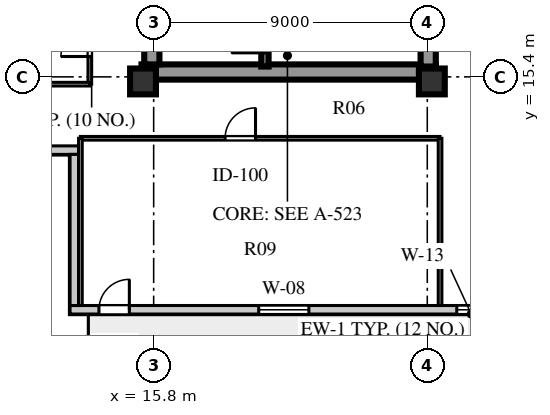
"""IFC4 building model, lengths in metres.
Left out: names, types, materials, properties, quantities, classifications, styles, units other than length and angle.
Written with IfcOpenShell. Run it as: python <this file> out.ifc"""

import sys

from ifc_helpers import new_model, si_unit, direction, frame, frame_2d, origin, origin_2d, place, context, subcontext, project, spatial, rectangle, extrude, element, fill, save


model = new_model("IFC4")
c1 = context("Model", 3, precision=1e-05, world=origin(), true_north=direction((0.0, 1.0)))
c2 = subcontext(c1, "Body", "Model", "MODEL_VIEW")
j1 = project(units=[si_unit("LENGTHUNIT", "METRE"), si_unit("PLANEANGLEUNIT", "RADIAN")], contexts=[c1])
p1 = place(None, origin())
s1 = spatial("IfcSite", under=j1, at=p1, CompositionType="ELEMENT")
p2 = place(p1, origin())
s2 = spatial("IfcBuilding", under=s1, at=p2, CompositionType="ELEMENT")
p3 = place(p2, frame((0.0, 0.0, 173.3)))
s3 = spatial("IfcBuildingStorey", under=s2, at=p3, CompositionType="ELEMENT", Elevation=173.3)
p4 = place(p3, frame((15.4, 15.56, 0.0), z_axis=(0.0, 0.0, 1.0), x_axis=(1.0, 0.0, 0.0)))
e1 = element("IfcWall", 1, at=p4, inside=s3, PredefinedType="SHEAR", context=c2, shape_type="SweptSolid", body=[
    extrude(rectangle(XDim=9.68, YDim=0.5, at=frame_2d((4.84, 0.0))), origin(), (0.0, 0.0, 1.0), 3.6),
])
p5 = place(p3, frame((15.74, 15.81, 0.0), z_axis=(0.0, 0.0, 1.0), x_axis=(0.0, 1.0, 0.0)))
e2 = element("IfcWall", 2, at=p5, inside=s3, PredefinedType="SHEAR", context=c2, shape_type="SweptSolid", body=[
    extrude(rectangle(XDim=25.63, YDim=0.5, at=frame_2d((12.815, 0.0))), origin(), (0.0, 0.0, 1.0), 3.6),
])
p6 = place(p3, frame((24.83, 15.74, 0.0), z_axis=(0.0, 0.0, 1.0), x_axis=(0.0, 1.0, 0.0)))
e3 = element("IfcWall", 3, at=p6, inside=s3, PredefinedType="SHEAR", context=c2, shape_type="SweptSolid", body=[
    extrude(rectangle(XDim=25.76, YDim=0.5, at=frame_2d((12.88, 0.0))), origin(), (0.0, 0.0, 1.0), 3.6),
])
p7 = place(p6, frame((1.61, 0.0, 0.0)))
e4 = element("IfcOpeningElement", 4, at=p7, cuts=e3, PredefinedType="OPENING", context=c2, shape_type="SweptSolid", body=[
    extrude(rectangle(XDim=1.2, YDim=2.1, at=frame_2d((0.6, 1.05))), frame((0.0, 0.26, 0.0), z_axis=(0.0, -1.0, 0.0), x_axis=(1.0, 0.0, 0.0)), (0.0, 0.0, 1.0), 0.52),
])
p8 = place(p6, frame((6.78, 0.0, 0.0)))
e5 = element("IfcOpeningElement", 5, at=p8, cuts=e3, PredefinedType="OPENING", context=c2, shape_type="SweptSolid", body=[
    extrude(rectangle(XDim=0.85, YDim=2.06, at=frame_2d((0.425, 1.03))), frame((0.0, 0.26, 0.0), z_axis=(0.0, -1.0, 0.0), x_axis=(1.0, 0.0, 0.0)), (0.0, 0.0, 1.0), 0.52),
])
p9 = place(p6, frame((12.11, 0.0, 0.0)))
e6 = element("IfcOpeningElement", 6, at=p9, cuts=e3, PredefinedType="OPENING", context=c2, shape_type="SweptSolid", body=[
    extrude(rectangle(XDim=1.5, YDim=2.12, at=frame_2d((0.75, 1.06))), frame((0.0, 0.26, 0.0), z_axis=(0.0, -1.0, 0.0), x_axis=(1.0, 0.0, 0.0)), (0.0, 0.0, 1.0), 0.52),
])
p10 = place(p6, frame((20.11, 0.0, 0.0)))
e7 = element("IfcOpeningElement", 7, at=p10, cuts=e3, PredefinedType="OPENING", context=c2, shape_type="SweptSolid", body=[
    extrude(rectangle(XDim=1.2, YDim=2.12, at=frame_2d((0.6, 1.06))), frame((0.0, 0.26, 0.0), z_axis=(0.0, -1.0, 0.0), x_axis=(1.0, 0.0, 0.0)), (0.0, 0.0, 1.0), 0.52),
])
p11 = place(p6, frame((24.01, 0.0, 0.0)))
e8 = element("IfcOpeningElement", 8, at=p11, cuts=e3, PredefinedType="OPENING", context=c2, shape_type="SweptSolid", body=[
    extrude(rectangle(XDim=0.95, YDim=2.1, at=frame_2d((0.475, 1.05))), frame((0.0, 0.26, 0.0), z_axis=(0.0, -1.0, 0.0), x_axis=(1.0, 0.0, 0.0)), (0.0, 0.0, 1.0), 0.52),
])
for number, where, z_axis, x_axis in (
    (9, (15.45, 15.25, 0.0), (0.0, 0.0, 1.0), (1.0, 0.0, 0.0)),
    (10, (24.95, 15.25, 0.0), (0.0, 0.0, 1.0), (1.0, 0.0, 0.0)),
):
    element("IfcColumn", number, at=place(p3, frame(where, z_axis=z_axis, x_axis=x_axis)), inside=s3, PredefinedType="COLUMN", context=c2, shape_type="SweptSolid", body=[
        extrude(rectangle(XDim=0.85, YDim=0.85, at=origin_2d()), origin(), (0.0, 0.0, 1.0), 3.6),
    ])
p12 = place(p3, frame((13.05, 7.74, 0.0), z_axis=(0.0, 0.0, 1.0), x_axis=(1.0, 0.0, 0.0)))
e11 = element("IfcWall", 11, at=p12, inside=s3, PredefinedType="STANDARD", context=c2, shape_type="SweptSolid", body=[
    extrude(rectangle(XDim=32.5, YDim=0.28, at=frame_2d((16.25, 0.0))), origin(), (0.0, 0.0, 1.0), 3.6),
])
p13 = place(p12, frame((0.95, 0.0, 0.0)))
e12 = element("IfcOpeningElement", 12, at=p13, cuts=e11, PredefinedType="OPENING", context=c2, shape_type="SweptSolid", body=[
    extrude(rectangle(XDim=1.0, YDim=2.05, at=frame_2d((0.5, 1.025))), frame((0.0, 0.15, 0.0), z_axis=(0.0, -1.0, 0.0), x_axis=(1.0, 0.0, 0.0)), (0.0, 0.0, 1.0), 0.3),
])
p14 = place(p12, frame((6.205, 0.0, 0.8)))
e13 = element("IfcOpeningElement", 13, at=p14, cuts=e11, PredefinedType="OPENING", context=c2, shape_type="SweptSolid", body=[
    extrude(rectangle(XDim=1.65, YDim=1.95, at=frame_2d((0.825, 0.975))), frame((0.0, 0.15, 0.0), z_axis=(0.0, -1.0, 0.0), x_axis=(1.0, 0.0, 0.0)), (0.0, 0.0, 1.0), 0.3),
])
p15 = place(p12, frame((12.72, 0.0, 0.8)))
e14 = element("IfcOpeningElement", 14, at=p15, cuts=e11, PredefinedType="OPENING", context=c2, shape_type="SweptSolid", body=[
    extrude(rectangle(XDim=0.95, YDim=1.65, at=frame_2d((0.475, 0.825))), frame((0.0, 0.15, 0.0), z_axis=(0.0, -1.0, 0.0), x_axis=(1.0, 0.0, 0.0)), (0.0, 0.0, 1.0), 0.3),
])
p16 = place(p12, frame((14.685, 0.0, 0.8)))
e15 = element("IfcOpeningElement", 15, at=p16, cuts=e11, PredefinedType="OPENING", context=c2, shape_type="SweptSolid", body=[
    extrude(rectangle(XDim=1.2, YDim=1.75, at=frame_2d((0.6, 0.875))), frame((0.0, 0.15, 0.0), z_axis=(0.0, -1.0, 0.0), x_axis=(1.0, 0.0, 0.0)), (0.0, 0.0, 1.0), 0.3),
])
p17 = place(p12, frame((17.085, 0.0, 0.8)))
e16 = element("IfcOpeningElement", 16, at=p17, cuts=e11, PredefinedType="OPENING", context=c2, shape_type="SweptSolid", body=[
    extrude(rectangle(XDim=1.8, YDim=2.0, at=frame_2d((0.9, 1.0))), frame((0.0, 0.15, 0.0), z_axis=(0.0, -1.0, 0.0), x_axis=(1.0, 0.0, 0.0)), (0.0, 0.0, 1.0), 0.3),
])
p18 = place(p12, frame((20.085, 0.0, 0.8)))
e17 = element("IfcOpeningElement", 17, at=p18, cuts=e11, PredefinedType="OPENING", context=c2, shape_type="SweptSolid", body=[
    extrude(rectangle(XDim=1.2, YDim=1.75, at=frame_2d((0.6, 0.875))), frame((0.0, 0.15, 0.0), z_axis=(0.0, -1.0, 0.0), x_axis=(1.0, 0.0, 0.0)), (0.0, 0.0, 1.0), 0.3),
])
p19 = place(p12, frame((23.055, 0.0, 0.8)))
e18 = element("IfcOpeningElement", 18, at=p19, cuts=e11, PredefinedType="OPENING", context=c2, shape_type="SweptSolid", body=[
    extrude(rectangle(XDim=1.2, YDim=1.75, at=frame_2d((0.6, 0.875))), frame((0.0, 0.15, 0.0), z_axis=(0.0, -1.0, 0.0), x_axis=(1.0, 0.0, 0.0)), (0.0, 0.0, 1.0), 0.3),
])
p20 = place(p12, frame((26.065, 0.0, 0.8)))
e19 = element("IfcOpeningElement", 19, at=p20, cuts=e11, PredefinedType="OPENING", context=c2, shape_type="SweptSolid", body=[
    extrude(rectangle(XDim=1.2, YDim=1.75, at=frame_2d((0.6, 0.875))), frame((0.0, 0.15, 0.0), z_axis=(0.0, -1.0, 0.0), x_axis=(1.0, 0.0, 0.0)), (0.0, 0.0, 1.0), 0.3),
])
p21 = place(p12, frame((29.03, 0.0, 0.8)))
e20 = element("IfcOpeningElement", 20, at=p21, cuts=e11, PredefinedType="OPENING", context=c2, shape_type="SweptSolid", body=[
    extrude(rectangle(XDim=2.1, YDim=1.95, at=frame_2d((1.05, 0.975))), frame((0.0, 0.15, 0.0), z_axis=(0.0, -1.0, 0.0), x_axis=(1.0, 0.0, 0.0)), (0.0, 0.0, 1.0), 0.3),
])
p22 = place(p3, frame((7.8, 12.99, 0.0), z_axis=(0.0, 0.0, 1.0), x_axis=(1.0, 0.0, 0.0)))
e21 = element("IfcWall", 21, at=p22, inside=s3, PredefinedType="STANDARD", context=c2, shape_type="SweptSolid", body=[
    extrude(rectangle(XDim=5.53, YDim=0.28, at=frame_2d((2.765, 0.0))), origin(), (0.0, 0.0, 1.0), 3.6),
])
p23 = place(p3, frame((13.19, 12.85, 0.0), z_axis=(0.0, 0.0, 1.0), x_axis=(0.0, -1.0, 0.0)))
e22 = element("IfcWall", 22, at=p23, inside=s3, PredefinedType="STANDARD", context=c2, shape_type="SweptSolid", body=[
    extrude(rectangle(XDim=4.97, YDim=0.28, at=frame_2d((2.485, 0.0))), origin(), (0.0, 0.0, 1.0), 3.6),
])
p24 = place(p3, frame((19.46, 15.74, 0.0), z_axis=(0.0, 0.0, 1.0), x_axis=(0.0, 1.0, 0.0)))
e23 = element("IfcWall", 23, at=p24, inside=s3, PredefinedType="SHEAR", context=c2, shape_type="SweptSolid", body=[
    extrude(rectangle(XDim=8.2, YDim=0.24, at=frame_2d((4.1, 0.0))), origin(), (0.0, 0.0, 1.0), 3.85),
])
p25 = place(p24, frame((0.45, 0.0, 0.0)))
e24 = element("IfcOpeningElement", 24, at=p25, cuts=e23, PredefinedType="OPENING", context=c2, shape_type="SweptSolid", body=[
    extrude(rectangle(XDim=1.1, YDim=2.1, at=frame_2d((0.55, 1.05))), frame((0.0, 0.13, 0.0), z_axis=(0.0, -1.0, 0.0), x_axis=(1.0, 0.0, 0.0)), (0.0, 0.0, 1.0), 0.26),
])
p26 = place(p3, frame((13.7, 15.16, 0.0), z_axis=(0.0, 0.0, 1.0), x_axis=(0.0, 1.0, 0.0)))
e25 = element("IfcWall", 25, at=p26, inside=s3, PredefinedType="PARTITIONING", context=c2, shape_type="SweptSolid", body=[
    extrude(rectangle(XDim=26.88, YDim=0.12, at=frame_2d((13.44, 0.0))), origin(), (0.0, 0.0, 1.0), 3.6),
])
p27 = place(p26, frame((0.91, 0.0, 0.0)))
e26 = element("IfcOpeningElement", 26, at=p27, cuts=e25, PredefinedType="OPENING", context=c2, shape_type="SweptSolid", body=[
    extrude(rectangle(XDim=0.95, YDim=2.1, at=frame_2d((0.475, 1.05))), frame((0.0, 0.07, 0.0), z_axis=(0.0, -1.0, 0.0), x_axis=(1.0, 0.0, 0.0)), (0.0, 0.0, 1.0), 0.14),
])
p28 = place(p26, frame((9.84, 0.0, 0.0)))
e27 = element("IfcOpeningElement", 27, at=p28, cuts=e25, PredefinedType="OPENING", context=c2, shape_type="SweptSolid", body=[
    extrude(rectangle(XDim=0.95, YDim=2.1, at=frame_2d((0.475, 1.05))), frame((0.0, 0.07, 0.0), z_axis=(0.0, -1.0, 0.0), x_axis=(1.0, 0.0, 0.0)), (0.0, 0.0, 1.0), 0.14),
])
p29 = place(p26, frame((18.69, 0.0, 0.0)))
e28 = element("IfcOpeningElement", 28, at=p29, cuts=e25, PredefinedType="OPENING", context=c2, shape_type="SweptSolid", body=[
    extrude(rectangle(XDim=0.95, YDim=2.1, at=frame_2d((0.475, 1.05))), frame((0.0, 0.07, 0.0), z_axis=(0.0, -1.0, 0.0), x_axis=(1.0, 0.0, 0.0)), (0.0, 0.0, 1.0), 0.14),
])
p30 = place(p3, frame((8.08, 15.16, 0.0), z_axis=(0.0, 0.0, 1.0), x_axis=(1.0, 0.0, 0.0)))
e29 = element("IfcWall", 29, at=p30, inside=s3, PredefinedType="PARTITIONING", context=c2, shape_type="SweptSolid", body=[
    extrude(rectangle(XDim=5.62, YDim=0.12, at=frame_2d((2.81, 0.0))), origin(), (0.0, 0.0, 1.0), 3.15),
])
p31 = place(p3, frame((13.39, 13.38, 0.0), z_axis=(0.0, 0.0, 1.0), x_axis=(1.0, 0.0, 0.0)))
e30 = element("IfcWall", 30, at=p31, inside=s3, PredefinedType="PARTITIONING", context=c2, shape_type="SweptSolid", body=[
    extrude(rectangle(XDim=11.83, YDim=0.12, at=frame_2d((5.915, 0.0))), origin(), (0.0, 0.0, 1.0), 3.6),
])
p32 = place(p31, frame((4.76, 0.0, 0.0)))
e31 = element("IfcOpeningElement", 31, at=p32, cuts=e30, PredefinedType="OPENING", context=c2, shape_type="SweptSolid", body=[
    extrude(rectangle(XDim=1.0, YDim=2.08, at=frame_2d((0.5, 1.04))), frame((0.0, 0.07, 0.0), z_axis=(0.0, -1.0, 0.0), x_axis=(1.0, 0.0, 0.0)), (0.0, 0.0, 1.0), 0.14),
])
p33 = place(p3, frame((13.39, 7.88, 0.0), z_axis=(0.0, 0.0, 1.0), x_axis=(0.0, 1.0, 0.0)))
e32 = element("IfcWall", 32, at=p33, inside=s3, PredefinedType="PARTITIONING", context=c2, shape_type="SweptSolid", body=[
    extrude(rectangle(XDim=5.5, YDim=0.12, at=frame_2d((2.75, 0.0))), origin(), (0.0, 0.0, 1.0), 3.6),
])
p34 = place(p3, frame((25.22, 7.88, 0.0), z_axis=(0.0, 0.0, 1.0), x_axis=(0.0, 1.0, 0.0)))
e33 = element("IfcWall", 33, at=p34, inside=s3, PredefinedType="PARTITIONING", context=c2, shape_type="SweptSolid", body=[
    extrude(rectangle(XDim=5.5, YDim=0.12, at=frame_2d((2.75, 0.0))), origin(), (0.0, 0.0, 1.0), 3.15),
])
p35 = place(p13, frame((1.0, 0.0, 0.0), z_axis=(0.0, 0.0, 1.0), x_axis=(-1.0, 0.0, 0.0)))
e34 = element("IfcDoor", 34, at=p35, inside=s3, OperationType="SINGLE_SWING_LEFT", PredefinedType="DOOR", context=c2, shape_type="SweptSolid", body=[
    extrude(rectangle(XDim=1.0, YDim=2.05, at=frame_2d((0.5, 1.025))), frame((0.0, 0.025, 0.0), z_axis=(0.0, -1.0, 0.0), x_axis=(1.0, 0.0, 0.0)), (0.0, 0.0, 1.0), 0.05),
])
fill(e12, e34)
p36 = place(p14, origin())
e35 = element("IfcWindow", 35, at=p36, inside=s3, PartitioningType="SINGLE_PANEL", PredefinedType="WINDOW", context=c2, shape_type="SweptSolid", body=[
    extrude(rectangle(XDim=1.65, YDim=1.95, at=frame_2d((0.825, 0.975))), frame((0.0, 0.03, 0.0), z_axis=(0.0, -1.0, 0.0), x_axis=(1.0, 0.0, 0.0)), (0.0, 0.0, 1.0), 0.06),
])
fill(e13, e35)
p37 = place(p15, origin())
e36 = element("IfcWindow", 36, at=p37, inside=s3, PartitioningType="SINGLE_PANEL", PredefinedType="WINDOW", context=c2, shape_type="SweptSolid", body=[
    extrude(rectangle(XDim=0.95, YDim=1.65, at=frame_2d((0.475, 0.825))), frame((0.0, 0.03, 0.0), z_axis=(0.0, -1.0, 0.0), x_axis=(1.0, 0.0, 0.0)), (0.0, 0.0, 1.0), 0.06),
])
fill(e14, e36)
p38 = place(p25, origin())
e37 = element("IfcDoor", 37, at=p38, inside=s3, OperationType="SINGLE_SWING_LEFT", PredefinedType="DOOR", context=c2, shape_type="SweptSolid", body=[
    extrude(rectangle(XDim=1.1, YDim=2.1, at=frame_2d((0.55, 1.05))), frame((0.0, 0.025, 0.0), z_axis=(0.0, -1.0, 0.0), x_axis=(1.0, 0.0, 0.0)), (0.0, 0.0, 1.0), 0.05),
])
fill(e24, e37)
p39 = place(p32, frame((1.0, 0.0, 0.0), z_axis=(0.0, 0.0, 1.0), x_axis=(-1.0, 0.0, 0.0)))
e38 = element("IfcDoor", 38, at=p39, inside=s3, OperationType="SINGLE_SWING_LEFT", PredefinedType="DOOR", context=c2, shape_type="SweptSolid", body=[
    extrude(rectangle(XDim=1.0, YDim=2.08, at=frame_2d((0.5, 1.04))), frame((0.0, 0.025, 0.0), z_axis=(0.0, -1.0, 0.0), x_axis=(1.0, 0.0, 0.0)), (0.0, 0.0, 1.0), 0.05),
])
fill(e31, e38)
p40 = place(p27, origin())
e39 = element("IfcDoor", 39, at=p40, inside=s3, OperationType="SINGLE_SWING_LEFT", PredefinedType="DOOR", context=c2, shape_type="SweptSolid", body=[
    extrude(rectangle(XDim=0.95, YDim=2.1, at=frame_2d((0.475, 1.05))), frame((0.0, 0.025, 0.0), z_axis=(0.0, -1.0, 0.0), x_axis=(1.0, 0.0, 0.0)), (0.0, 0.0, 1.0), 0.05),
])
fill(e26, e39)
save(model, sys.argv[1])
